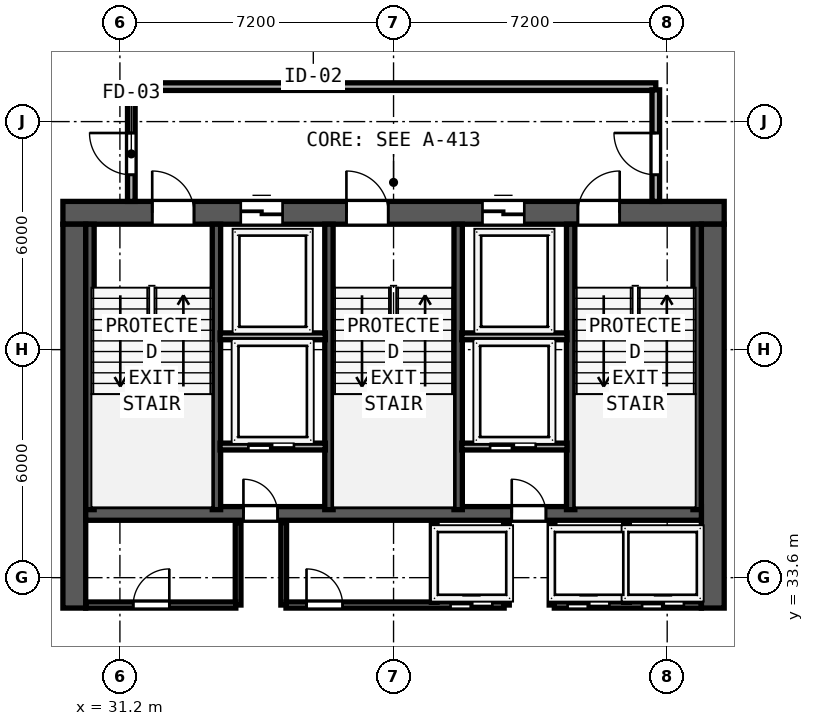
"""IFC4 building model, lengths in metres.
Left out: names, types, materials, properties, quantities, classifications, styles, units other than length and angle.
Written with IfcOpenShell. Run it as: python <this file> out.ifc"""

import sys

from ifc_helpers import new_model, si_unit, direction, frame, frame_2d, origin, place, context, subcontext, project, spatial, rectangle, extrude, element, fill, save


model = new_model("IFC4")
c1 = context("Model", 3, precision=1e-05, world=origin(), true_north=direction((0.0, 1.0)))
c2 = subcontext(c1, "Body", "Model", "MODEL_VIEW")
j1 = project(units=[si_unit("LENGTHUNIT", "METRE"), si_unit("PLANEANGLEUNIT", "RADIAN")], contexts=[c1])
p1 = place(None, origin())
s1 = spatial("IfcSite", under=j1, at=p1, CompositionType="ELEMENT")
p2 = place(p1, origin())
s2 = spatial("IfcBuilding", under=s1, at=p2, CompositionType="ELEMENT")
p3 = place(p2, frame((0.0, 0.0, 223.0)))
s3 = spatial("IfcBuildingStorey", under=s2, at=p3, CompositionType="ELEMENT", Elevation=223.0)
p4 = place(p3, frame((29.7, 43.2, 0.0), z_axis=(0.0, 0.0, 1.0), x_axis=(1.0, 0.0, 0.0)))
e1 = element("IfcWall", 1, at=p4, inside=s3, PredefinedType="SHEAR", context=c2, shape_type="SweptSolid", body=[
    extrude(rectangle(XDim=17.4, YDim=0.6, at=frame_2d((8.7, 0.0))), origin(), (0.0, 0.0, 1.0), 3.62),
])
p5 = place(p4, frame((2.35, 0.0, 0.0)))
e2 = element("IfcOpeningElement", 2, at=p5, cuts=e1, PredefinedType="OPENING", context=c2, shape_type="SweptSolid", body=[
    extrude(rectangle(XDim=1.1, YDim=2.15, at=frame_2d((0.55, 1.075))), frame((0.0, 0.31, 0.0), z_axis=(0.0, -1.0, 0.0), x_axis=(1.0, 0.0, 0.0)), (0.0, 0.0, 1.0), 0.62),
])
p6 = place(p4, frame((7.46, 0.0, 0.0)))
e3 = element("IfcOpeningElement", 3, at=p6, cuts=e1, PredefinedType="OPENING", context=c2, shape_type="SweptSolid", body=[
    extrude(rectangle(XDim=1.1, YDim=2.15, at=frame_2d((0.55, 1.075))), frame((0.0, 0.31, 0.0), z_axis=(0.0, -1.0, 0.0), x_axis=(1.0, 0.0, 0.0)), (0.0, 0.0, 1.0), 0.62),
])
p7 = place(p4, frame((13.55, 0.0, 0.0)))
e4 = element("IfcOpeningElement", 4, at=p7, cuts=e1, PredefinedType="OPENING", context=c2, shape_type="SweptSolid", body=[
    extrude(rectangle(XDim=1.1, YDim=2.15, at=frame_2d((0.55, 1.075))), frame((0.0, 0.31, 0.0), z_axis=(0.0, -1.0, 0.0), x_axis=(1.0, 0.0, 0.0)), (0.0, 0.0, 1.0), 0.62),
])
p8 = place(p4, frame((4.68, 0.0, 0.0)))
e5 = element("IfcOpeningElement", 5, at=p8, cuts=e1, PredefinedType="OPENING", context=c2, shape_type="SweptSolid", body=[
    extrude(rectangle(XDim=1.1, YDim=2.2, at=frame_2d((0.55, 1.1))), frame((0.0, 0.31, 0.0), z_axis=(0.0, -1.0, 0.0), x_axis=(1.0, 0.0, 0.0)), (0.0, 0.0, 1.0), 0.62),
])
p9 = place(p4, frame((11.04, 0.0, 0.0)))
e6 = element("IfcOpeningElement", 6, at=p9, cuts=e1, PredefinedType="OPENING", context=c2, shape_type="SweptSolid", body=[
    extrude(rectangle(XDim=1.1, YDim=2.2, at=frame_2d((0.55, 1.1))), frame((0.0, 0.31, 0.0), z_axis=(0.0, -1.0, 0.0), x_axis=(1.0, 0.0, 0.0)), (0.0, 0.0, 1.0), 0.62),
])
for number, where, z_axis, x_axis in (
    (7, (30.0, 32.8, 0.0), (0.0, 0.0, 1.0), (0.0, 1.0, 0.0)),
    (8, (46.8, 32.8, 0.0), (0.0, 0.0, 1.0), (0.0, 1.0, 0.0)),
):
    element("IfcWall", number, at=place(p3, frame(where, z_axis=z_axis, x_axis=x_axis)), inside=s3, PredefinedType="SHEAR", context=c2, shape_type="SweptSolid", body=[
        extrude(rectangle(XDim=10.1, YDim=0.6, at=frame_2d((5.05, 0.0))), origin(), (0.0, 0.0, 1.0), 3.62),
    ])
p10 = place(p3, frame((30.3, 35.29, 0.0), z_axis=(0.0, 0.0, 1.0), x_axis=(1.0, 0.0, 0.0)))
e9 = element("IfcWall", 9, at=p10, inside=s3, PredefinedType="SHEAR", context=c2, shape_type="SweptSolid", body=[
    extrude(rectangle(XDim=16.2, YDim=0.36, at=frame_2d((8.1, 0.0))), origin(), (0.0, 0.0, 1.0), 3.62),
])
p11 = place(p10, frame((5.05, 0.0, 0.0), z_axis=(0.0, 0.0, 1.0), x_axis=(-1.0, 0.0, 0.0)))
e10 = element("IfcOpeningElement", 10, at=p11, cuts=e9, PredefinedType="OPENING", context=c2, shape_type="SweptSolid", body=[
    extrude(rectangle(XDim=0.9, YDim=2.1, at=frame_2d((0.45, 1.05))), frame((0.0, 0.19, 0.0), z_axis=(0.0, -1.0, 0.0), x_axis=(1.0, 0.0, 0.0)), (0.0, 0.0, 1.0), 0.38),
])
p12 = place(p10, frame((12.11, 0.0, 0.0), z_axis=(0.0, 0.0, 1.0), x_axis=(-1.0, 0.0, 0.0)))
e11 = element("IfcOpeningElement", 11, at=p12, cuts=e9, PredefinedType="OPENING", context=c2, shape_type="SweptSolid", body=[
    extrude(rectangle(XDim=0.9, YDim=2.1, at=frame_2d((0.45, 1.05))), frame((0.0, 0.19, 0.0), z_axis=(0.0, -1.0, 0.0), x_axis=(1.0, 0.0, 0.0)), (0.0, 0.0, 1.0), 0.38),
])
for number, where, z_axis, x_axis in (
    (12, (30.412, 35.39, 0.0), (0.0, 0.0, 1.0), (0.0, 1.0, 0.0)),
    (13, (33.74, 35.39, 0.0), (0.0, 0.0, 1.0), (0.0, 1.0, 0.0)),
    (14, (36.7, 35.39, 0.0), (0.0, 0.0, 1.0), (0.0, 1.0, 0.0)),
    (15, (40.1, 35.39, 0.0), (0.0, 0.0, 1.0), (0.0, 1.0, 0.0)),
    (16, (43.06, 35.39, 0.0), (0.0, 0.0, 1.0), (0.0, 1.0, 0.0)),
    (17, (46.388, 35.39, 0.0), (0.0, 0.0, 1.0), (0.0, 1.0, 0.0)),
):
    element("IfcWall", number, at=place(p3, frame(where, z_axis=z_axis, x_axis=x_axis)), inside=s3, PredefinedType="SHEAR", context=c2, shape_type="SweptSolid", body=[
        extrude(rectangle(XDim=7.51, YDim=0.22, at=frame_2d((3.755, 0.0))), origin(), (0.0, 0.0, 1.0), 3.62),
    ])
p13 = place(p3, frame((31.5, 46.52, 0.0), z_axis=(0.0, 0.0, 1.0), x_axis=(1.0, 0.0, 0.0)))
e18 = element("IfcWall", 18, at=p13, inside=s3, PredefinedType="SOLIDWALL", context=c2, shape_type="SweptSolid", body=[
    extrude(rectangle(XDim=13.8, YDim=0.2, at=frame_2d((6.9, 0.0))), origin(), (0.0, 0.0, 1.0), 3.62),
])
p14 = place(p3, frame((31.5, 43.5, 0.0), z_axis=(0.0, 0.0, 1.0), x_axis=(0.0, 1.0, 0.0)))
e19 = element("IfcWall", 19, at=p14, inside=s3, PredefinedType="SOLIDWALL", context=c2, shape_type="SweptSolid", body=[
    extrude(rectangle(XDim=2.935, YDim=0.2, at=frame_2d((1.468, 0.0))), origin(), (0.0, 0.0, 1.0), 3.62),
])
p15 = place(p14, frame((1.8, 0.0, 0.0), z_axis=(0.0, 0.0, 1.0), x_axis=(-1.0, 0.0, 0.0)))
e20 = element("IfcOpeningElement", 20, at=p15, cuts=e19, PredefinedType="OPENING", context=c2, shape_type="SweptSolid", body=[
    extrude(rectangle(XDim=1.1, YDim=2.15, at=frame_2d((0.55, 1.075))), frame((0.0, 0.11, 0.0), z_axis=(0.0, -1.0, 0.0), x_axis=(1.0, 0.0, 0.0)), (0.0, 0.0, 1.0), 0.22),
])
p16 = place(p3, frame((45.3, 43.5, 0.0), z_axis=(0.0, 0.0, 1.0), x_axis=(0.0, 1.0, 0.0)))
e21 = element("IfcWall", 21, at=p16, inside=s3, PredefinedType="SOLIDWALL", context=c2, shape_type="SweptSolid", body=[
    extrude(rectangle(XDim=2.935, YDim=0.2, at=frame_2d((1.468, 0.0))), origin(), (0.0, 0.0, 1.0), 3.62),
])
p17 = place(p16, frame((0.7, 0.0, 0.0)))
e22 = element("IfcOpeningElement", 22, at=p17, cuts=e21, PredefinedType="OPENING", context=c2, shape_type="SweptSolid", body=[
    extrude(rectangle(XDim=1.1, YDim=2.15, at=frame_2d((0.55, 1.075))), frame((0.0, 0.11, 0.0), z_axis=(0.0, -1.0, 0.0), x_axis=(1.0, 0.0, 0.0)), (0.0, 0.0, 1.0), 0.22),
])
for number, where, z_axis, x_axis in (
    (23, (33.835, 39.95, 0.0), (0.0, 0.0, 1.0), (1.0, 0.0, 0.0)),
    (24, (40.195, 39.95, 0.0), (0.0, 0.0, 1.0), (1.0, 0.0, 0.0)),
):
    element("IfcWall", number, at=place(p3, frame(where, z_axis=z_axis, x_axis=x_axis)), inside=s3, PredefinedType="SOLIDWALL", context=c2, shape_type="SweptSolid", body=[
        extrude(rectangle(XDim=2.77, YDim=0.18, at=frame_2d((1.385, 0.0))), origin(), (0.0, 0.0, 1.0), 3.62),
    ])
p18 = place(p3, frame((33.835, 37.05, 0.0), z_axis=(0.0, 0.0, 1.0), x_axis=(1.0, 0.0, 0.0)))
e25 = element("IfcWall", 25, at=p18, inside=s3, PredefinedType="SOLIDWALL", context=c2, shape_type="SweptSolid", body=[
    extrude(rectangle(XDim=2.77, YDim=0.18, at=frame_2d((1.385, 0.0))), origin(), (0.0, 0.0, 1.0), 3.62),
])
p19 = place(p18, frame((1.945, 0.0, 0.0), z_axis=(0.0, 0.0, 1.0), x_axis=(-1.0, 0.0, 0.0)))
e26 = element("IfcOpeningElement", 26, at=p19, cuts=e25, PredefinedType="OPENING", context=c2, shape_type="SweptSolid", body=[
    extrude(rectangle(XDim=1.2, YDim=2.2, at=frame_2d((0.6, 1.1))), frame((0.0, 0.1, 0.0), z_axis=(0.0, -1.0, 0.0), x_axis=(1.0, 0.0, 0.0)), (0.0, 0.0, 1.0), 0.2),
])
for number, where, z_axis, x_axis in (
    (27, (34.31, 32.88, 0.0), (0.0, 0.0, 1.0), (0.0, 1.0, 0.0)),
    (28, (35.51, 32.88, 0.0), (0.0, 0.0, 1.0), (0.0, 1.0, 0.0)),
):
    element("IfcWall", number, at=place(p3, frame(where, z_axis=z_axis, x_axis=x_axis)), inside=s3, PredefinedType="SOLIDWALL", context=c2, shape_type="SweptSolid", body=[
        extrude(rectangle(XDim=2.17, YDim=0.15, at=frame_2d((1.085, 0.0))), origin(), (0.0, 0.0, 1.0), 3.62),
    ])
p20 = place(p3, frame((40.195, 37.05, 0.0), z_axis=(0.0, 0.0, 1.0), x_axis=(1.0, 0.0, 0.0)))
e29 = element("IfcWall", 29, at=p20, inside=s3, PredefinedType="SOLIDWALL", context=c2, shape_type="SweptSolid", body=[
    extrude(rectangle(XDim=2.77, YDim=0.18, at=frame_2d((1.385, 0.0))), origin(), (0.0, 0.0, 1.0), 3.62),
])
p21 = place(p20, frame((1.945, 0.0, 0.0), z_axis=(0.0, 0.0, 1.0), x_axis=(-1.0, 0.0, 0.0)))
e30 = element("IfcOpeningElement", 30, at=p21, cuts=e29, PredefinedType="OPENING", context=c2, shape_type="SweptSolid", body=[
    extrude(rectangle(XDim=1.2, YDim=2.2, at=frame_2d((0.6, 1.1))), frame((0.0, 0.1, 0.0), z_axis=(0.0, -1.0, 0.0), x_axis=(1.0, 0.0, 0.0)), (0.0, 0.0, 1.0), 0.2),
])
for number, where, z_axis, x_axis in (
    (31, (41.37, 32.88, 0.0), (0.0, 0.0, 1.0), (0.0, 1.0, 0.0)),
    (32, (42.57, 32.88, 0.0), (0.0, 0.0, 1.0), (0.0, 1.0, 0.0)),
):
    element("IfcWall", number, at=place(p3, frame(where, z_axis=z_axis, x_axis=x_axis)), inside=s3, PredefinedType="SOLIDWALL", context=c2, shape_type="SweptSolid", body=[
        extrude(rectangle(XDim=2.17, YDim=0.15, at=frame_2d((1.085, 0.0))), origin(), (0.0, 0.0, 1.0), 3.62),
    ])
p22 = place(p3, frame((30.3, 32.88, 0.0), z_axis=(0.0, 0.0, 1.0), x_axis=(1.0, 0.0, 0.0)))
e33 = element("IfcWall", 33, at=p22, inside=s3, PredefinedType="SOLIDWALL", context=c2, shape_type="SweptSolid", body=[
    extrude(rectangle(XDim=3.95, YDim=0.16, at=frame_2d((1.975, 0.0))), origin(), (0.0, 0.0, 1.0), 3.62),
])
p23 = place(p22, frame((2.2, 0.0, 0.0), z_axis=(0.0, 0.0, 1.0), x_axis=(-1.0, 0.0, 0.0)))
e34 = element("IfcOpeningElement", 34, at=p23, cuts=e33, PredefinedType="OPENING", context=c2, shape_type="SweptSolid", body=[
    extrude(rectangle(XDim=0.95, YDim=2.12, at=frame_2d((0.475, 1.06))), frame((0.0, 0.09, 0.0), z_axis=(0.0, -1.0, 0.0), x_axis=(1.0, 0.0, 0.0)), (0.0, 0.0, 1.0), 0.18),
])
p24 = place(p3, frame((35.57, 32.88, 0.0), z_axis=(0.0, 0.0, 1.0), x_axis=(1.0, 0.0, 0.0)))
e35 = element("IfcWall", 35, at=p24, inside=s3, PredefinedType="SOLIDWALL", context=c2, shape_type="SweptSolid", body=[
    extrude(rectangle(XDim=5.74, YDim=0.16, at=frame_2d((2.87, 0.0))), origin(), (0.0, 0.0, 1.0), 3.62),
])
p25 = place(p24, frame((1.49, 0.0, 0.0), z_axis=(0.0, 0.0, 1.0), x_axis=(-1.0, 0.0, 0.0)))
e36 = element("IfcOpeningElement", 36, at=p25, cuts=e35, PredefinedType="OPENING", context=c2, shape_type="SweptSolid", body=[
    extrude(rectangle(XDim=0.95, YDim=2.12, at=frame_2d((0.475, 1.06))), frame((0.0, 0.09, 0.0), z_axis=(0.0, -1.0, 0.0), x_axis=(1.0, 0.0, 0.0)), (0.0, 0.0, 1.0), 0.18),
])
p26 = place(p24, frame((5.43, 0.0, 0.0), z_axis=(0.0, 0.0, 1.0), x_axis=(-1.0, 0.0, 0.0)))
e37 = element("IfcOpeningElement", 37, at=p26, cuts=e35, PredefinedType="OPENING", context=c2, shape_type="SweptSolid", body=[
    extrude(rectangle(XDim=1.1, YDim=2.2, at=frame_2d((0.55, 1.1))), frame((0.0, 0.09, 0.0), z_axis=(0.0, -1.0, 0.0), x_axis=(1.0, 0.0, 0.0)), (0.0, 0.0, 1.0), 0.18),
])
p27 = place(p3, frame((42.63, 32.88, 0.0), z_axis=(0.0, 0.0, 1.0), x_axis=(1.0, 0.0, 0.0)))
e38 = element("IfcWall", 38, at=p27, inside=s3, PredefinedType="SOLIDWALL", context=c2, shape_type="SweptSolid", body=[
    extrude(rectangle(XDim=3.87, YDim=0.16, at=frame_2d((1.935, 0.0))), origin(), (0.0, 0.0, 1.0), 3.62),
])
p28 = place(p27, frame((1.45, 0.0, 0.0), z_axis=(0.0, 0.0, 1.0), x_axis=(-1.0, 0.0, 0.0)))
e39 = element("IfcOpeningElement", 39, at=p28, cuts=e38, PredefinedType="OPENING", context=c2, shape_type="SweptSolid", body=[
    extrude(rectangle(XDim=1.1, YDim=2.2, at=frame_2d((0.55, 1.1))), frame((0.0, 0.09, 0.0), z_axis=(0.0, -1.0, 0.0), x_axis=(1.0, 0.0, 0.0)), (0.0, 0.0, 1.0), 0.18),
])
p29 = place(p27, frame((3.41, 0.0, 0.0), z_axis=(0.0, 0.0, 1.0), x_axis=(-1.0, 0.0, 0.0)))
e40 = element("IfcOpeningElement", 40, at=p29, cuts=e38, PredefinedType="OPENING", context=c2, shape_type="SweptSolid", body=[
    extrude(rectangle(XDim=1.1, YDim=2.2, at=frame_2d((0.55, 1.1))), frame((0.0, 0.09, 0.0), z_axis=(0.0, -1.0, 0.0), x_axis=(1.0, 0.0, 0.0)), (0.0, 0.0, 1.0), 0.18),
])
for number, where, z_axis, x_axis in (
    (41, (39.47, 32.95, 0.0), (0.0, 0.0, 1.0), (0.0, 1.0, 0.0)),
    (42, (44.53, 32.95, 0.0), (0.0, 0.0, 1.0), (0.0, 1.0, 0.0)),
):
    element("IfcWall", number, at=place(p3, frame(where, z_axis=z_axis, x_axis=x_axis)), inside=s3, PredefinedType="SOLIDWALL", context=c2, shape_type="SweptSolid", body=[
        extrude(rectangle(XDim=2.05, YDim=0.15, at=frame_2d((1.025, 0.0))), origin(), (0.0, 0.0, 1.0), 3.62),
    ])
p30 = place(p5, origin())
e43 = element("IfcDoor", 43, at=p30, inside=s3, OperationType="SINGLE_SWING_LEFT", PredefinedType="DOOR", context=c2, shape_type="SweptSolid", body=[
    extrude(rectangle(XDim=1.1, YDim=2.15, at=frame_2d((0.55, 1.075))), frame((0.0, 0.185, 0.0), z_axis=(0.0, -1.0, 0.0), x_axis=(1.0, 0.0, 0.0)), (0.0, 0.0, 1.0), 0.05),
])
fill(e2, e43)
p31 = place(p6, origin())
e44 = element("IfcDoor", 44, at=p31, inside=s3, OperationType="SINGLE_SWING_LEFT", PredefinedType="DOOR", context=c2, shape_type="SweptSolid", body=[
    extrude(rectangle(XDim=1.1, YDim=2.15, at=frame_2d((0.55, 1.075))), frame((0.0, 0.185, 0.0), z_axis=(0.0, -1.0, 0.0), x_axis=(1.0, 0.0, 0.0)), (0.0, 0.0, 1.0), 0.05),
])
fill(e3, e44)
p32 = place(p7, origin())
e45 = element("IfcDoor", 45, at=p32, inside=s3, OperationType="SINGLE_SWING_RIGHT", PredefinedType="DOOR", context=c2, shape_type="SweptSolid", body=[
    extrude(rectangle(XDim=1.1, YDim=2.15, at=frame_2d((0.55, 1.075))), frame((0.0, 0.185, 0.0), z_axis=(0.0, -1.0, 0.0), x_axis=(1.0, 0.0, 0.0)), (0.0, 0.0, 1.0), 0.05),
])
fill(e4, e45)
p33 = place(p15, origin())
e46 = element("IfcDoor", 46, at=p33, inside=s3, OperationType="SINGLE_SWING_LEFT", PredefinedType="DOOR", context=c2, shape_type="SweptSolid", body=[
    extrude(rectangle(XDim=1.1, YDim=2.15, at=frame_2d((0.55, 1.075))), frame((0.0, 0.025, 0.0), z_axis=(0.0, -1.0, 0.0), x_axis=(1.0, 0.0, 0.0)), (0.0, 0.0, 1.0), 0.05),
])
fill(e20, e46)
p34 = place(p17, origin())
e47 = element("IfcDoor", 47, at=p34, inside=s3, OperationType="SINGLE_SWING_RIGHT", PredefinedType="DOOR", context=c2, shape_type="SweptSolid", body=[
    extrude(rectangle(XDim=1.1, YDim=2.15, at=frame_2d((0.55, 1.075))), frame((0.0, 0.025, 0.0), z_axis=(0.0, -1.0, 0.0), x_axis=(1.0, 0.0, 0.0)), (0.0, 0.0, 1.0), 0.05),
])
fill(e22, e47)
p35 = place(p8, origin())
e48 = element("IfcDoor", 48, at=p35, inside=s3, OperationType="SLIDING_TO_LEFT", PredefinedType="DOOR", context=c2, shape_type="SweptSolid", body=[
    extrude(rectangle(XDim=1.1, YDim=2.2, at=frame_2d((0.55, 1.1))), frame((0.0, 0.185, 0.0), z_axis=(0.0, -1.0, 0.0), x_axis=(1.0, 0.0, 0.0)), (0.0, 0.0, 1.0), 0.05),
])
fill(e5, e48)
p36 = place(p9, origin())
e49 = element("IfcDoor", 49, at=p36, inside=s3, OperationType="SLIDING_TO_LEFT", PredefinedType="DOOR", context=c2, shape_type="SweptSolid", body=[
    extrude(rectangle(XDim=1.1, YDim=2.2, at=frame_2d((0.55, 1.1))), frame((0.0, 0.185, 0.0), z_axis=(0.0, -1.0, 0.0), x_axis=(1.0, 0.0, 0.0)), (0.0, 0.0, 1.0), 0.05),
])
fill(e6, e49)
p37 = place(p19, origin())
e50 = element("IfcDoor", 50, at=p37, inside=s3, OperationType="SLIDING_TO_RIGHT", PredefinedType="DOOR", context=c2, shape_type="SweptSolid", body=[
    extrude(rectangle(XDim=1.2, YDim=2.2, at=frame_2d((0.6, 1.1))), frame((0.0, 0.025, 0.0), z_axis=(0.0, -1.0, 0.0), x_axis=(1.0, 0.0, 0.0)), (0.0, 0.0, 1.0), 0.05),
])
fill(e26, e50)
p38 = place(p11, origin())
e51 = element("IfcDoor", 51, at=p38, inside=s3, OperationType="SINGLE_SWING_RIGHT", PredefinedType="DOOR", context=c2, shape_type="SweptSolid", body=[
    extrude(rectangle(XDim=0.9, YDim=2.1, at=frame_2d((0.45, 1.05))), frame((0.0, 0.025, 0.0), z_axis=(0.0, -1.0, 0.0), x_axis=(1.0, 0.0, 0.0)), (0.0, 0.0, 1.0), 0.05),
])
fill(e10, e51)
p39 = place(p21, origin())
e52 = element("IfcDoor", 52, at=p39, inside=s3, OperationType="SLIDING_TO_RIGHT", PredefinedType="DOOR", context=c2, shape_type="SweptSolid", body=[
    extrude(rectangle(XDim=1.2, YDim=2.2, at=frame_2d((0.6, 1.1))), frame((0.0, 0.025, 0.0), z_axis=(0.0, -1.0, 0.0), x_axis=(1.0, 0.0, 0.0)), (0.0, 0.0, 1.0), 0.05),
])
fill(e30, e52)
p40 = place(p12, origin())
e53 = element("IfcDoor", 53, at=p40, inside=s3, OperationType="SINGLE_SWING_RIGHT", PredefinedType="DOOR", context=c2, shape_type="SweptSolid", body=[
    extrude(rectangle(XDim=0.9, YDim=2.1, at=frame_2d((0.45, 1.05))), frame((0.0, 0.025, 0.0), z_axis=(0.0, -1.0, 0.0), x_axis=(1.0, 0.0, 0.0)), (0.0, 0.0, 1.0), 0.05),
])
fill(e11, e53)
p41 = place(p23, origin())
e54 = element("IfcDoor", 54, at=p41, inside=s3, OperationType="SINGLE_SWING_LEFT", PredefinedType="DOOR", context=c2, shape_type="SweptSolid", body=[
    extrude(rectangle(XDim=0.95, YDim=2.12, at=frame_2d((0.475, 1.06))), frame((0.0, 0.025, 0.0), z_axis=(0.0, -1.0, 0.0), x_axis=(1.0, 0.0, 0.0)), (0.0, 0.0, 1.0), 0.05),
])
fill(e34, e54)
p42 = place(p25, origin())
e55 = element("IfcDoor", 55, at=p42, inside=s3, OperationType="SINGLE_SWING_RIGHT", PredefinedType="DOOR", context=c2, shape_type="SweptSolid", body=[
    extrude(rectangle(XDim=0.95, YDim=2.12, at=frame_2d((0.475, 1.06))), frame((0.0, 0.025, 0.0), z_axis=(0.0, -1.0, 0.0), x_axis=(1.0, 0.0, 0.0)), (0.0, 0.0, 1.0), 0.05),
])
fill(e36, e55)
p43 = place(p26, origin())
e56 = element("IfcDoor", 56, at=p43, inside=s3, OperationType="SLIDING_TO_RIGHT", PredefinedType="DOOR", context=c2, shape_type="SweptSolid", body=[
    extrude(rectangle(XDim=1.1, YDim=2.2, at=frame_2d((0.55, 1.1))), frame((0.0, 0.025, 0.0), z_axis=(0.0, -1.0, 0.0), x_axis=(1.0, 0.0, 0.0)), (0.0, 0.0, 1.0), 0.05),
])
fill(e37, e56)
p44 = place(p28, origin())
e57 = element("IfcDoor", 57, at=p44, inside=s3, OperationType="SLIDING_TO_RIGHT", PredefinedType="DOOR", context=c2, shape_type="SweptSolid", body=[
    extrude(rectangle(XDim=1.1, YDim=2.2, at=frame_2d((0.55, 1.1))), frame((0.0, 0.025, 0.0), z_axis=(0.0, -1.0, 0.0), x_axis=(1.0, 0.0, 0.0)), (0.0, 0.0, 1.0), 0.05),
])
fill(e39, e57)
p45 = place(p29, origin())
e58 = element("IfcDoor", 58, at=p45, inside=s3, OperationType="SLIDING_TO_RIGHT", PredefinedType="DOOR", context=c2, shape_type="SweptSolid", body=[
    extrude(rectangle(XDim=1.1, YDim=2.2, at=frame_2d((0.55, 1.1))), frame((0.0, 0.025, 0.0), z_axis=(0.0, -1.0, 0.0), x_axis=(1.0, 0.0, 0.0)), (0.0, 0.0, 1.0), 0.05),
])
fill(e40, e58)
save(model, sys.argv[1])
